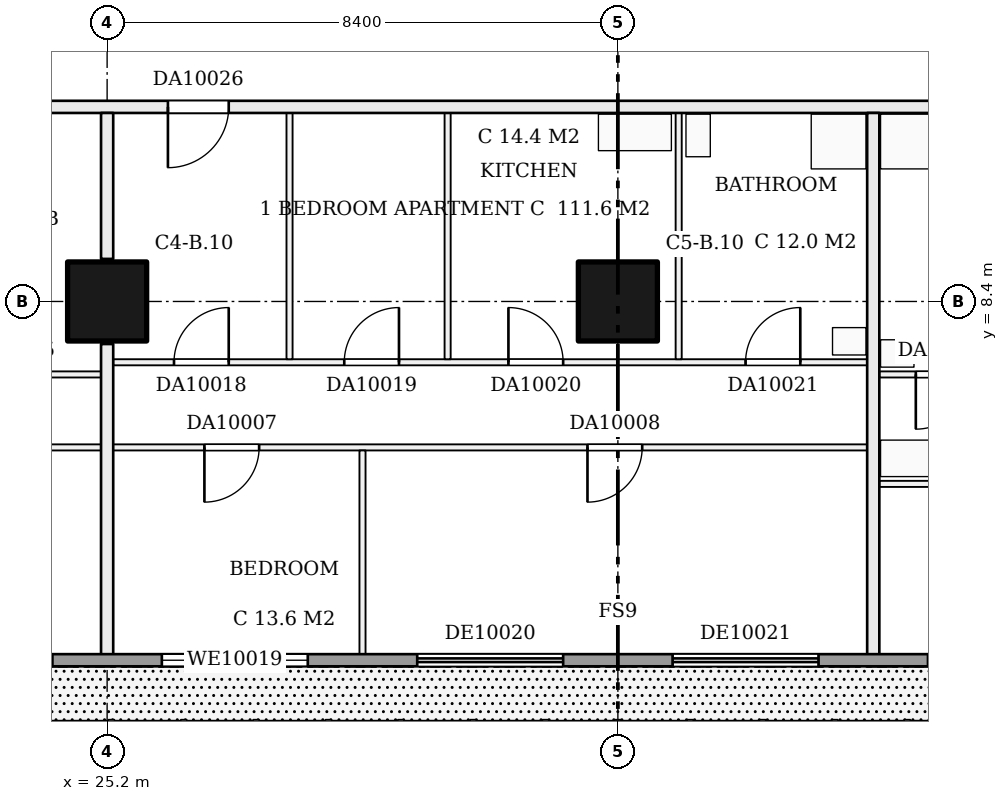
"""IFC4 building model, lengths in metres.
Left out: names, types, materials, properties, quantities, classifications, styles, units other than length and angle.
Written with IfcOpenShell. Run it as: python <this file> out.ifc"""

import sys

from ifc_helpers import new_model, si_unit, direction, frame, frame_2d, origin, origin_2d, place, context, subcontext, project, spatial, rectangle, extrude, element, fill, save


model = new_model("IFC4")
c1 = context("Model", 3, precision=1e-05, world=origin(), true_north=direction((0.0, 1.0)))
c2 = subcontext(c1, "Body", "Model", "MODEL_VIEW")
j1 = project(units=[si_unit("LENGTHUNIT", "METRE"), si_unit("PLANEANGLEUNIT", "RADIAN")], contexts=[c1])
p1 = place(None, origin())
s1 = spatial("IfcSite", under=j1, at=p1, CompositionType="ELEMENT")
p2 = place(p1, origin())
s2 = spatial("IfcBuilding", under=s1, at=p2, CompositionType="ELEMENT")
p3 = place(p2, frame((0.0, 0.0, 46.2)))
s3 = spatial("IfcBuildingStorey", under=s2, at=p3, CompositionType="ELEMENT", Elevation=46.2)
for number, where, z_axis, x_axis in (
    (1, (25.2, 8.4, 0.0), (0.0, 0.0, 1.0), (1.0, 0.0, 0.0)),
    (2, (33.6, 8.4, 0.0), (0.0, 0.0, 1.0), (1.0, 0.0, 0.0)),
):
    element("IfcColumn", number, at=place(p3, frame(where, z_axis=z_axis, x_axis=x_axis)), inside=s3, PredefinedType="COLUMN", context=c2, shape_type="SweptSolid", body=[
        extrude(rectangle(XDim=1.3, YDim=1.3, at=origin_2d()), origin(), (0.0, 0.0, 1.0), 3.22),
    ])
p4 = place(p3, frame((37.9, 5.4, 0.0), z_axis=(0.0, 0.0, 1.0), x_axis=(1.0, 0.0, 0.0)))
e3 = element("IfcWall", 3, at=p4, inside=s3, PredefinedType="PARTITIONING", context=c2, shape_type="SweptSolid", body=[
    extrude(rectangle(XDim=4.0, YDim=0.1, at=frame_2d((2.0, 0.0))), origin(), (0.0, 0.0, 1.0), 3.22),
])
p5 = place(p4, frame((1.5, 0.0, 0.0)))
e4 = element("IfcOpeningElement", 4, at=p5, cuts=e3, PredefinedType="OPENING", context=c2, shape_type="SweptSolid", body=[
    extrude(rectangle(XDim=0.9, YDim=2.1, at=frame_2d((0.45, 1.05))), frame((0.0, 0.06, 0.0), z_axis=(0.0, -1.0, 0.0), x_axis=(1.0, 0.0, 0.0)), (0.0, 0.0, 1.0), 0.12),
])
p6 = place(p3, frame((12.65, 6.0, 0.0), z_axis=(0.0, 0.0, 1.0), x_axis=(1.0, 0.0, 0.0)))
e5 = element("IfcWall", 5, at=p6, inside=s3, PredefinedType="PARTITIONING", context=c2, shape_type="SweptSolid", body=[
    extrude(rectangle(XDim=25.05, YDim=0.1, at=frame_2d((12.525, 0.0))), origin(), (0.0, 0.0, 1.0), 3.22),
])
p7 = place(p6, frame((1.65, 0.0, 0.0)))
e6 = element("IfcOpeningElement", 6, at=p7, cuts=e5, PredefinedType="OPENING", context=c2, shape_type="SweptSolid", body=[
    extrude(rectangle(XDim=0.9, YDim=2.1, at=frame_2d((0.45, 1.05))), frame((0.0, 0.06, 0.0), z_axis=(0.0, -1.0, 0.0), x_axis=(1.0, 0.0, 0.0)), (0.0, 0.0, 1.0), 0.12),
])
p8 = place(p6, frame((5.75, 0.0, 0.0)))
e7 = element("IfcOpeningElement", 7, at=p8, cuts=e5, PredefinedType="OPENING", context=c2, shape_type="SweptSolid", body=[
    extrude(rectangle(XDim=0.9, YDim=2.1, at=frame_2d((0.45, 1.05))), frame((0.0, 0.06, 0.0), z_axis=(0.0, -1.0, 0.0), x_axis=(1.0, 0.0, 0.0)), (0.0, 0.0, 1.0), 0.12),
])
p9 = place(p6, frame((10.05, 0.0, 0.0)))
e8 = element("IfcOpeningElement", 8, at=p9, cuts=e5, PredefinedType="OPENING", context=c2, shape_type="SweptSolid", body=[
    extrude(rectangle(XDim=0.9, YDim=2.1, at=frame_2d((0.45, 1.05))), frame((0.0, 0.06, 0.0), z_axis=(0.0, -1.0, 0.0), x_axis=(1.0, 0.0, 0.0)), (0.0, 0.0, 1.0), 0.12),
])
p10 = place(p6, frame((14.15, 0.0, 0.0)))
e9 = element("IfcOpeningElement", 9, at=p10, cuts=e5, PredefinedType="OPENING", context=c2, shape_type="SweptSolid", body=[
    extrude(rectangle(XDim=0.9, YDim=2.1, at=frame_2d((0.45, 1.05))), frame((0.0, 0.06, 0.0), z_axis=(0.0, -1.0, 0.0), x_axis=(1.0, 0.0, 0.0)), (0.0, 0.0, 1.0), 0.12),
])
p11 = place(p6, frame((20.45, 0.0, 0.0)))
e10 = element("IfcOpeningElement", 10, at=p11, cuts=e5, PredefinedType="OPENING", context=c2, shape_type="SweptSolid", body=[
    extrude(rectangle(XDim=0.9, YDim=2.1, at=frame_2d((0.45, 1.05))), frame((0.0, 0.06, 0.0), z_axis=(0.0, -1.0, 0.0), x_axis=(1.0, 0.0, 0.0)), (0.0, 0.0, 1.0), 0.12),
])
p12 = place(p3, frame((16.9, 7.2, 0.0), z_axis=(0.0, 0.0, 1.0), x_axis=(1.0, 0.0, 0.0)))
e11 = element("IfcWall", 11, at=p12, inside=s3, PredefinedType="PARTITIONING", context=c2, shape_type="SweptSolid", body=[
    extrude(rectangle(XDim=8.2, YDim=0.1, at=frame_2d((4.1, 0.0))), origin(), (0.0, 0.0, 1.0), 3.22),
])
p13 = place(p12, frame((0.7, 0.0, 0.0)))
e12 = element("IfcOpeningElement", 12, at=p13, cuts=e11, PredefinedType="OPENING", context=c2, shape_type="SweptSolid", body=[
    extrude(rectangle(XDim=0.9, YDim=2.1, at=frame_2d((0.45, 1.05))), frame((0.0, 0.06, 0.0), z_axis=(0.0, -1.0, 0.0), x_axis=(1.0, 0.0, 0.0)), (0.0, 0.0, 1.0), 0.12),
])
p14 = place(p12, frame((3.267, 0.0, 0.0)))
e13 = element("IfcOpeningElement", 13, at=p14, cuts=e11, PredefinedType="OPENING", context=c2, shape_type="SweptSolid", body=[
    extrude(rectangle(XDim=0.9, YDim=2.1, at=frame_2d((0.45, 1.05))), frame((0.0, 0.06, 0.0), z_axis=(0.0, -1.0, 0.0), x_axis=(1.0, 0.0, 0.0)), (0.0, 0.0, 1.0), 0.12),
])
p15 = place(p12, frame((6.233, 0.0, 0.0)))
e14 = element("IfcOpeningElement", 14, at=p15, cuts=e11, PredefinedType="OPENING", context=c2, shape_type="SweptSolid", body=[
    extrude(rectangle(XDim=0.9, YDim=2.1, at=frame_2d((0.45, 1.05))), frame((0.0, 0.06, 0.0), z_axis=(0.0, -1.0, 0.0), x_axis=(1.0, 0.0, 0.0)), (0.0, 0.0, 1.0), 0.12),
])
p16 = place(p3, frame((37.9, 7.2, 0.0), z_axis=(0.0, 0.0, 1.0), x_axis=(1.0, 0.0, 0.0)))
e15 = element("IfcWall", 15, at=p16, inside=s3, PredefinedType="PARTITIONING", context=c2, shape_type="SweptSolid", body=[
    extrude(rectangle(XDim=4.0, YDim=0.1, at=frame_2d((2.0, 0.0))), origin(), (0.0, 0.0, 1.0), 3.22),
])
p17 = place(p16, frame((2.64, 0.0, 0.0)))
e16 = element("IfcOpeningElement", 16, at=p17, cuts=e15, PredefinedType="OPENING", context=c2, shape_type="SweptSolid", body=[
    extrude(rectangle(XDim=0.9, YDim=2.1, at=frame_2d((0.45, 1.05))), frame((0.0, 0.06, 0.0), z_axis=(0.0, -1.0, 0.0), x_axis=(1.0, 0.0, 0.0)), (0.0, 0.0, 1.0), 0.12),
])
p18 = place(p16, frame((0.6, 0.0, 0.0)))
e17 = element("IfcOpeningElement", 17, at=p18, cuts=e15, PredefinedType="OPENING", context=c2, shape_type="SweptSolid", body=[
    extrude(rectangle(XDim=0.9, YDim=2.1, at=frame_2d((0.45, 1.05))), frame((0.0, 0.06, 0.0), z_axis=(0.0, -1.0, 0.0), x_axis=(1.0, 0.0, 0.0)), (0.0, 0.0, 1.0), 0.12),
])
p19 = place(p3, frame((25.3, 7.4, 0.0), z_axis=(0.0, 0.0, 1.0), x_axis=(1.0, 0.0, 0.0)))
e18 = element("IfcWall", 18, at=p19, inside=s3, PredefinedType="PARTITIONING", context=c2, shape_type="SweptSolid", body=[
    extrude(rectangle(XDim=12.4, YDim=0.1, at=frame_2d((6.2, 0.0))), origin(), (0.0, 0.0, 1.0), 3.22),
])
p20 = place(p19, frame((1.0, 0.0, 0.0)))
e19 = element("IfcOpeningElement", 19, at=p20, cuts=e18, PredefinedType="OPENING", context=c2, shape_type="SweptSolid", body=[
    extrude(rectangle(XDim=0.9, YDim=2.1, at=frame_2d((0.45, 1.05))), frame((0.0, 0.06, 0.0), z_axis=(0.0, -1.0, 0.0), x_axis=(1.0, 0.0, 0.0)), (0.0, 0.0, 1.0), 0.12),
])
p21 = place(p19, frame((3.8, 0.0, 0.0)))
e20 = element("IfcOpeningElement", 20, at=p21, cuts=e18, PredefinedType="OPENING", context=c2, shape_type="SweptSolid", body=[
    extrude(rectangle(XDim=0.9, YDim=2.1, at=frame_2d((0.45, 1.05))), frame((0.0, 0.06, 0.0), z_axis=(0.0, -1.0, 0.0), x_axis=(1.0, 0.0, 0.0)), (0.0, 0.0, 1.0), 0.12),
])
p22 = place(p19, frame((6.5, 0.0, 0.0)))
e21 = element("IfcOpeningElement", 21, at=p22, cuts=e18, PredefinedType="OPENING", context=c2, shape_type="SweptSolid", body=[
    extrude(rectangle(XDim=0.9, YDim=2.1, at=frame_2d((0.45, 1.05))), frame((0.0, 0.06, 0.0), z_axis=(0.0, -1.0, 0.0), x_axis=(1.0, 0.0, 0.0)), (0.0, 0.0, 1.0), 0.12),
])
p23 = place(p19, frame((10.4, 0.0, 0.0)))
e22 = element("IfcOpeningElement", 22, at=p23, cuts=e18, PredefinedType="OPENING", context=c2, shape_type="SweptSolid", body=[
    extrude(rectangle(XDim=0.9, YDim=2.1, at=frame_2d((0.45, 1.05))), frame((0.0, 0.06, 0.0), z_axis=(0.0, -1.0, 0.0), x_axis=(1.0, 0.0, 0.0)), (0.0, 0.0, 1.0), 0.12),
])
p24 = place(p3, frame((11.5, 11.6, 0.0), z_axis=(0.0, 0.0, 1.0), x_axis=(1.0, 0.0, 0.0)))
e23 = element("IfcWall", 23, at=p24, inside=s3, PredefinedType="PARTITIONING", context=c2, shape_type="SweptSolid", body=[
    extrude(rectangle(XDim=30.5, YDim=0.2, at=frame_2d((15.25, 0.0))), origin(), (0.0, 0.0, 1.0), 3.22),
])
p25 = place(p24, frame((1.6, 0.0, 0.0)))
e24 = element("IfcOpeningElement", 24, at=p25, cuts=e23, PredefinedType="OPENING", context=c2, shape_type="SweptSolid", body=[
    extrude(rectangle(XDim=1.0, YDim=2.1, at=frame_2d((0.5, 1.05))), frame((0.0, 0.11, 0.0), z_axis=(0.0, -1.0, 0.0), x_axis=(1.0, 0.0, 0.0)), (0.0, 0.0, 1.0), 0.22),
])
p26 = place(p24, frame((6.0, 0.0, 0.0)))
e25 = element("IfcOpeningElement", 25, at=p26, cuts=e23, PredefinedType="OPENING", context=c2, shape_type="SweptSolid", body=[
    extrude(rectangle(XDim=1.0, YDim=2.1, at=frame_2d((0.5, 1.05))), frame((0.0, 0.11, 0.0), z_axis=(0.0, -1.0, 0.0), x_axis=(1.0, 0.0, 0.0)), (0.0, 0.0, 1.0), 0.22),
])
p27 = place(p24, frame((14.7, 0.0, 0.0)))
e26 = element("IfcOpeningElement", 26, at=p27, cuts=e23, PredefinedType="OPENING", context=c2, shape_type="SweptSolid", body=[
    extrude(rectangle(XDim=1.0, YDim=2.1, at=frame_2d((0.5, 1.05))), frame((0.0, 0.11, 0.0), z_axis=(0.0, -1.0, 0.0), x_axis=(1.0, 0.0, 0.0)), (0.0, 0.0, 1.0), 0.22),
])
p28 = place(p24, frame((29.04, 0.0, 0.0)))
e27 = element("IfcOpeningElement", 27, at=p28, cuts=e23, PredefinedType="OPENING", context=c2, shape_type="SweptSolid", body=[
    extrude(rectangle(XDim=1.0, YDim=2.1, at=frame_2d((0.5, 1.05))), frame((0.0, 0.11, 0.0), z_axis=(0.0, -1.0, 0.0), x_axis=(1.0, 0.0, 0.0)), (0.0, 0.0, 1.0), 0.22),
])
p29 = place(p3, frame((25.2, 2.5, 0.0), z_axis=(0.0, 0.0, 1.0), x_axis=(0.0, 1.0, 0.0)))
e28 = element("IfcWall", 28, at=p29, inside=s3, PredefinedType="PARTITIONING", context=c2, shape_type="SweptSolid", body=[
    extrude(rectangle(XDim=5.2, YDim=0.2, at=frame_2d((2.6, 0.0))), origin(), (0.0, 0.0, 1.0), 3.22),
])
p30 = place(p3, frame((25.2, 9.1, 0.0), z_axis=(0.0, 0.0, 1.0), x_axis=(0.0, 1.0, 0.0)))
e29 = element("IfcWall", 29, at=p30, inside=s3, PredefinedType="PARTITIONING", context=c2, shape_type="SweptSolid", body=[
    extrude(rectangle(XDim=2.4, YDim=0.2, at=frame_2d((1.2, 0.0))), origin(), (0.0, 0.0, 1.0), 3.22),
])
p31 = place(p3, frame((28.2, 7.45, 0.0), z_axis=(0.0, 0.0, 1.0), x_axis=(0.0, 1.0, 0.0)))
e30 = element("IfcWall", 30, at=p31, inside=s3, PredefinedType="PARTITIONING", context=c2, shape_type="SweptSolid", body=[
    extrude(rectangle(XDim=4.05, YDim=0.1, at=frame_2d((2.025, 0.0))), origin(), (0.0, 0.0, 1.0), 3.22),
])
p32 = place(p3, frame((29.4, 2.5, 0.0), z_axis=(0.0, 0.0, 1.0), x_axis=(0.0, 1.0, 0.0)))
e31 = element("IfcWall", 31, at=p32, inside=s3, PredefinedType="PARTITIONING", context=c2, shape_type="SweptSolid", body=[
    extrude(rectangle(XDim=3.45, YDim=0.1, at=frame_2d((1.725, 0.0))), origin(), (0.0, 0.0, 1.0), 3.22),
])
for number, where, z_axis, x_axis in (
    (32, (30.8, 7.45, 0.0), (0.0, 0.0, 1.0), (0.0, 1.0, 0.0)),
    (33, (34.6, 7.45, 0.0), (0.0, 0.0, 1.0), (0.0, 1.0, 0.0)),
):
    element("IfcWall", number, at=place(p3, frame(where, z_axis=z_axis, x_axis=x_axis)), inside=s3, PredefinedType="PARTITIONING", context=c2, shape_type="SweptSolid", body=[
        extrude(rectangle(XDim=4.05, YDim=0.1, at=frame_2d((2.025, 0.0))), origin(), (0.0, 0.0, 1.0), 3.22),
    ])
p33 = place(p3, frame((37.8, 2.5, 0.0), z_axis=(0.0, 0.0, 1.0), x_axis=(0.0, 1.0, 0.0)))
e34 = element("IfcWall", 34, at=p33, inside=s3, PredefinedType="PARTITIONING", context=c2, shape_type="SweptSolid", body=[
    extrude(rectangle(XDim=9.0, YDim=0.2, at=frame_2d((4.5, 0.0))), origin(), (0.0, 0.0, 1.0), 3.22),
])
p34 = place(p3, frame((4.8, 2.5, 0.0), z_axis=(0.0, 0.0, 1.0), x_axis=(1.0, 0.0, 0.0)))
e35 = element("IfcWall", 35, at=p34, inside=s3, PredefinedType="SOLIDWALL", context=c2, shape_type="SweptSolid", body=[
    extrude(rectangle(XDim=57.6, YDim=0.2, at=frame_2d((28.8, 0.0))), origin(), (0.0, 0.0, 1.0), 3.22),
])
p35 = place(p34, frame((0.3, 0.0, 0.0)))
e36 = element("IfcOpeningElement", 36, at=p35, cuts=e35, PredefinedType="OPENING", context=c2, shape_type="SweptSolid", body=[
    extrude(rectangle(XDim=2.4, YDim=2.2, at=frame_2d((1.2, 1.1))), frame((0.0, 0.11, 0.0), z_axis=(0.0, -1.0, 0.0), x_axis=(1.0, 0.0, 0.0)), (0.0, 0.0, 1.0), 0.22),
])
p36 = place(p34, frame((4.5, 0.0, 0.9)))
e37 = element("IfcOpeningElement", 37, at=p36, cuts=e35, PredefinedType="OPENING", context=c2, shape_type="SweptSolid", body=[
    extrude(rectangle(XDim=2.4, YDim=1.5, at=frame_2d((1.2, 0.75))), frame((0.0, 0.11, 0.0), z_axis=(0.0, -1.0, 0.0), x_axis=(1.0, 0.0, 0.0)), (0.0, 0.0, 1.0), 0.22),
])
p37 = place(p34, frame((8.7, 0.0, 0.9)))
e38 = element("IfcOpeningElement", 38, at=p37, cuts=e35, PredefinedType="OPENING", context=c2, shape_type="SweptSolid", body=[
    extrude(rectangle(XDim=2.4, YDim=1.5, at=frame_2d((1.2, 0.75))), frame((0.0, 0.11, 0.0), z_axis=(0.0, -1.0, 0.0), x_axis=(1.0, 0.0, 0.0)), (0.0, 0.0, 1.0), 0.22),
])
p38 = place(p34, frame((12.9, 0.0, 0.0)))
e39 = element("IfcOpeningElement", 39, at=p38, cuts=e35, PredefinedType="OPENING", context=c2, shape_type="SweptSolid", body=[
    extrude(rectangle(XDim=2.4, YDim=2.2, at=frame_2d((1.2, 1.1))), frame((0.0, 0.11, 0.0), z_axis=(0.0, -1.0, 0.0), x_axis=(1.0, 0.0, 0.0)), (0.0, 0.0, 1.0), 0.22),
])
p39 = place(p34, frame((17.1, 0.0, 0.9)))
e40 = element("IfcOpeningElement", 40, at=p39, cuts=e35, PredefinedType="OPENING", context=c2, shape_type="SweptSolid", body=[
    extrude(rectangle(XDim=2.4, YDim=1.5, at=frame_2d((1.2, 0.75))), frame((0.0, 0.11, 0.0), z_axis=(0.0, -1.0, 0.0), x_axis=(1.0, 0.0, 0.0)), (0.0, 0.0, 1.0), 0.22),
])
p40 = place(p34, frame((21.3, 0.0, 0.9)))
e41 = element("IfcOpeningElement", 41, at=p40, cuts=e35, PredefinedType="OPENING", context=c2, shape_type="SweptSolid", body=[
    extrude(rectangle(XDim=2.4, YDim=1.5, at=frame_2d((1.2, 0.75))), frame((0.0, 0.11, 0.0), z_axis=(0.0, -1.0, 0.0), x_axis=(1.0, 0.0, 0.0)), (0.0, 0.0, 1.0), 0.22),
])
p41 = place(p34, frame((25.5, 0.0, 0.0)))
e42 = element("IfcOpeningElement", 42, at=p41, cuts=e35, PredefinedType="OPENING", context=c2, shape_type="SweptSolid", body=[
    extrude(rectangle(XDim=2.4, YDim=2.2, at=frame_2d((1.2, 1.1))), frame((0.0, 0.11, 0.0), z_axis=(0.0, -1.0, 0.0), x_axis=(1.0, 0.0, 0.0)), (0.0, 0.0, 1.0), 0.22),
])
p42 = place(p34, frame((29.7, 0.0, 0.0)))
e43 = element("IfcOpeningElement", 43, at=p42, cuts=e35, PredefinedType="OPENING", context=c2, shape_type="SweptSolid", body=[
    extrude(rectangle(XDim=2.4, YDim=2.2, at=frame_2d((1.2, 1.1))), frame((0.0, 0.11, 0.0), z_axis=(0.0, -1.0, 0.0), x_axis=(1.0, 0.0, 0.0)), (0.0, 0.0, 1.0), 0.22),
])
p43 = place(p34, frame((33.9, 0.0, 0.0)))
e44 = element("IfcOpeningElement", 44, at=p43, cuts=e35, PredefinedType="OPENING", context=c2, shape_type="SweptSolid", body=[
    extrude(rectangle(XDim=2.4, YDim=2.2, at=frame_2d((1.2, 1.1))), frame((0.0, 0.11, 0.0), z_axis=(0.0, -1.0, 0.0), x_axis=(1.0, 0.0, 0.0)), (0.0, 0.0, 1.0), 0.22),
])
p44 = place(p34, frame((38.1, 0.0, 0.9)))
e45 = element("IfcOpeningElement", 45, at=p44, cuts=e35, PredefinedType="OPENING", context=c2, shape_type="SweptSolid", body=[
    extrude(rectangle(XDim=2.4, YDim=1.5, at=frame_2d((1.2, 0.75))), frame((0.0, 0.11, 0.0), z_axis=(0.0, -1.0, 0.0), x_axis=(1.0, 0.0, 0.0)), (0.0, 0.0, 1.0), 0.22),
])
p45 = place(p34, frame((42.3, 0.0, 0.9)))
e46 = element("IfcOpeningElement", 46, at=p45, cuts=e35, PredefinedType="OPENING", context=c2, shape_type="SweptSolid", body=[
    extrude(rectangle(XDim=2.4, YDim=1.5, at=frame_2d((1.2, 0.75))), frame((0.0, 0.11, 0.0), z_axis=(0.0, -1.0, 0.0), x_axis=(1.0, 0.0, 0.0)), (0.0, 0.0, 1.0), 0.22),
])
p46 = place(p34, frame((46.5, 0.0, 0.0)))
e47 = element("IfcOpeningElement", 47, at=p46, cuts=e35, PredefinedType="OPENING", context=c2, shape_type="SweptSolid", body=[
    extrude(rectangle(XDim=2.4, YDim=2.2, at=frame_2d((1.2, 1.1))), frame((0.0, 0.11, 0.0), z_axis=(0.0, -1.0, 0.0), x_axis=(1.0, 0.0, 0.0)), (0.0, 0.0, 1.0), 0.22),
])
p47 = place(p34, frame((50.7, 0.0, 0.9)))
e48 = element("IfcOpeningElement", 48, at=p47, cuts=e35, PredefinedType="OPENING", context=c2, shape_type="SweptSolid", body=[
    extrude(rectangle(XDim=2.4, YDim=1.5, at=frame_2d((1.2, 0.75))), frame((0.0, 0.11, 0.0), z_axis=(0.0, -1.0, 0.0), x_axis=(1.0, 0.0, 0.0)), (0.0, 0.0, 1.0), 0.22),
])
p48 = place(p34, frame((54.9, 0.0, 0.9)))
e49 = element("IfcOpeningElement", 49, at=p48, cuts=e35, PredefinedType="OPENING", context=c2, shape_type="SweptSolid", body=[
    extrude(rectangle(XDim=2.4, YDim=1.5, at=frame_2d((1.2, 0.75))), frame((0.0, 0.11, 0.0), z_axis=(0.0, -1.0, 0.0), x_axis=(1.0, 0.0, 0.0)), (0.0, 0.0, 1.0), 0.22),
])
p49 = place(p10, frame((0.9, 0.0, 0.0), z_axis=(0.0, 0.0, 1.0), x_axis=(-1.0, 0.0, 0.0)))
e50 = element("IfcDoor", 50, at=p49, inside=s3, OperationType="SINGLE_SWING_RIGHT", PredefinedType="DOOR", context=c2, shape_type="SweptSolid", body=[
    extrude(rectangle(XDim=0.9, YDim=2.1, at=frame_2d((0.45, 1.05))), frame((0.0, 0.025, 0.0), z_axis=(0.0, -1.0, 0.0), x_axis=(1.0, 0.0, 0.0)), (0.0, 0.0, 1.0), 0.05),
])
fill(e9, e50)
p50 = place(p11, frame((0.9, 0.0, 0.0), z_axis=(0.0, 0.0, 1.0), x_axis=(-1.0, 0.0, 0.0)))
e51 = element("IfcDoor", 51, at=p50, inside=s3, OperationType="SINGLE_SWING_RIGHT", PredefinedType="DOOR", context=c2, shape_type="SweptSolid", body=[
    extrude(rectangle(XDim=0.9, YDim=2.1, at=frame_2d((0.45, 1.05))), frame((0.0, 0.025, 0.0), z_axis=(0.0, -1.0, 0.0), x_axis=(1.0, 0.0, 0.0)), (0.0, 0.0, 1.0), 0.05),
])
fill(e10, e51)
p51 = place(p18, frame((0.9, 0.0, 0.0), z_axis=(0.0, 0.0, 1.0), x_axis=(-1.0, 0.0, 0.0)))
e52 = element("IfcDoor", 52, at=p51, inside=s3, OperationType="SINGLE_SWING_RIGHT", PredefinedType="DOOR", context=c2, shape_type="SweptSolid", body=[
    extrude(rectangle(XDim=0.9, YDim=2.1, at=frame_2d((0.45, 1.05))), frame((0.0, 0.025, 0.0), z_axis=(0.0, -1.0, 0.0), x_axis=(1.0, 0.0, 0.0)), (0.0, 0.0, 1.0), 0.05),
])
fill(e17, e52)
p52 = place(p20, origin())
e53 = element("IfcDoor", 53, at=p52, inside=s3, OperationType="SINGLE_SWING_RIGHT", PredefinedType="DOOR", context=c2, shape_type="SweptSolid", body=[
    extrude(rectangle(XDim=0.9, YDim=2.1, at=frame_2d((0.45, 1.05))), frame((0.0, 0.025, 0.0), z_axis=(0.0, -1.0, 0.0), x_axis=(1.0, 0.0, 0.0)), (0.0, 0.0, 1.0), 0.05),
])
fill(e19, e53)
p53 = place(p21, origin())
e54 = element("IfcDoor", 54, at=p53, inside=s3, OperationType="SINGLE_SWING_RIGHT", PredefinedType="DOOR", context=c2, shape_type="SweptSolid", body=[
    extrude(rectangle(XDim=0.9, YDim=2.1, at=frame_2d((0.45, 1.05))), frame((0.0, 0.025, 0.0), z_axis=(0.0, -1.0, 0.0), x_axis=(1.0, 0.0, 0.0)), (0.0, 0.0, 1.0), 0.05),
])
fill(e20, e54)
p54 = place(p22, origin())
e55 = element("IfcDoor", 55, at=p54, inside=s3, OperationType="SINGLE_SWING_LEFT", PredefinedType="DOOR", context=c2, shape_type="SweptSolid", body=[
    extrude(rectangle(XDim=0.9, YDim=2.1, at=frame_2d((0.45, 1.05))), frame((0.0, 0.025, 0.0), z_axis=(0.0, -1.0, 0.0), x_axis=(1.0, 0.0, 0.0)), (0.0, 0.0, 1.0), 0.05),
])
fill(e21, e55)
p55 = place(p23, origin())
e56 = element("IfcDoor", 56, at=p55, inside=s3, OperationType="SINGLE_SWING_RIGHT", PredefinedType="DOOR", context=c2, shape_type="SweptSolid", body=[
    extrude(rectangle(XDim=0.9, YDim=2.1, at=frame_2d((0.45, 1.05))), frame((0.0, 0.025, 0.0), z_axis=(0.0, -1.0, 0.0), x_axis=(1.0, 0.0, 0.0)), (0.0, 0.0, 1.0), 0.05),
])
fill(e22, e56)
p56 = place(p27, frame((1.0, 0.0, 0.0), z_axis=(0.0, 0.0, 1.0), x_axis=(-1.0, 0.0, 0.0)))
e57 = element("IfcDoor", 57, at=p56, inside=s3, OperationType="SINGLE_SWING_RIGHT", PredefinedType="DOOR", context=c2, shape_type="SweptSolid", body=[
    extrude(rectangle(XDim=1.0, YDim=2.1, at=frame_2d((0.5, 1.05))), frame((0.0, 0.025, 0.0), z_axis=(0.0, -1.0, 0.0), x_axis=(1.0, 0.0, 0.0)), (0.0, 0.0, 1.0), 0.05),
])
fill(e26, e57)
p57 = place(p40, origin())
e58 = element("IfcWindow", 58, at=p57, inside=s3, PartitioningType="SINGLE_PANEL", PredefinedType="WINDOW", context=c2, shape_type="SweptSolid", body=[
    extrude(rectangle(XDim=2.4, YDim=1.5, at=frame_2d((1.2, 0.75))), frame((0.0, 0.03, 0.0), z_axis=(0.0, -1.0, 0.0), x_axis=(1.0, 0.0, 0.0)), (0.0, 0.0, 1.0), 0.06),
])
fill(e41, e58)
p58 = place(p41, origin())
e59 = element("IfcDoor", 59, at=p58, inside=s3, OperationType="DOUBLE_DOOR_SLIDING", PredefinedType="DOOR", context=c2, shape_type="SweptSolid", body=[
    extrude(rectangle(XDim=2.4, YDim=2.2, at=frame_2d((1.2, 1.1))), frame((0.0, 0.025, 0.0), z_axis=(0.0, -1.0, 0.0), x_axis=(1.0, 0.0, 0.0)), (0.0, 0.0, 1.0), 0.05),
])
fill(e42, e59)
p59 = place(p42, origin())
e60 = element("IfcDoor", 60, at=p59, inside=s3, OperationType="DOUBLE_DOOR_SLIDING", PredefinedType="DOOR", context=c2, shape_type="SweptSolid", body=[
    extrude(rectangle(XDim=2.4, YDim=2.2, at=frame_2d((1.2, 1.1))), frame((0.0, 0.025, 0.0), z_axis=(0.0, -1.0, 0.0), x_axis=(1.0, 0.0, 0.0)), (0.0, 0.0, 1.0), 0.05),
])
fill(e43, e60)
save(model, sys.argv[1])
